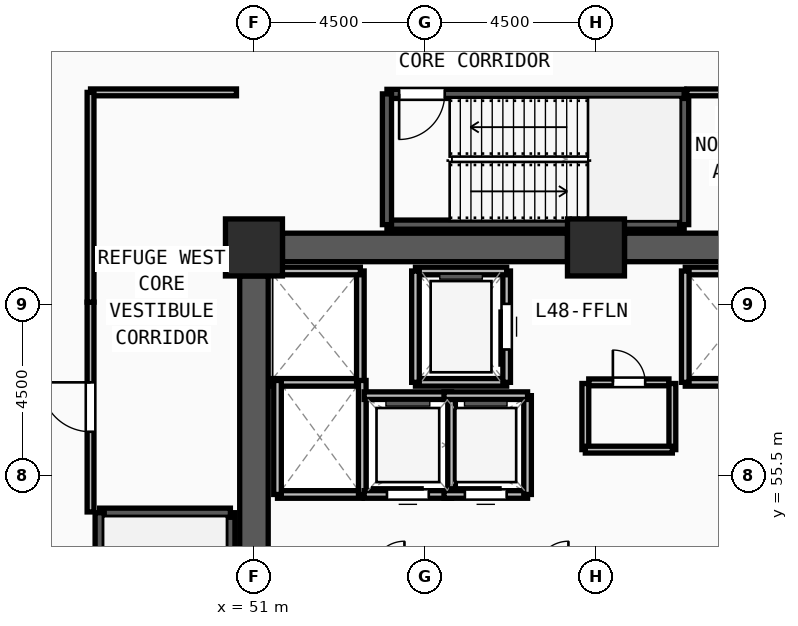
"""IFC4 building model, lengths in metres.
Left out: names, types, materials, properties, quantities, classifications, styles, units other than length and angle.
Written with IfcOpenShell. Run it as: python <this file> out.ifc"""

import sys

from ifc_helpers import new_model, si_unit, direction, frame, frame_2d, origin, origin_2d, place, context, subcontext, project, spatial, rectangle, extrude, source, transform, mapped, element, fill, save


model = new_model("IFC4")
c1 = context("Model", 3, precision=1e-05, world=origin(), true_north=direction((0.0, 1.0)))
c2 = subcontext(c1, "Body", "Model", "MODEL_VIEW")
j1 = project(units=[si_unit("LENGTHUNIT", "METRE"), si_unit("PLANEANGLEUNIT", "RADIAN")], contexts=[c1])
p1 = place(None, origin())
s1 = spatial("IfcSite", under=j1, at=p1, CompositionType="ELEMENT")
p2 = place(p1, origin())
s2 = spatial("IfcBuilding", under=s1, at=p2, CompositionType="ELEMENT")
p3 = place(p2, frame((0.0, 0.0, 185.25)))
s3 = spatial("IfcBuildingStorey", under=s2, at=p3, CompositionType="ELEMENT", Elevation=185.25)
m1 = source(origin(), c2, "Body", "SweptSolid", [
    extrude(rectangle(XDim=1.5, YDim=1.5, at=origin_2d()), origin(), (0.0, 0.0, 1.0), 4.5),
])
for number, where, z_axis, x_axis in (
    (1, (60.0, 61.5, 0.0), (0.0, 0.0, 1.0), (1.0, 0.0, 0.0)),
    (2, (51.0, 61.5, 0.0), (0.0, 0.0, 1.0), (1.0, 0.0, 0.0)),
):
    element("IfcColumn", number, at=place(p3, frame(where, z_axis=z_axis, x_axis=x_axis)), inside=s3, PredefinedType="COLUMN", context=c2, shape_type="MappedRepresentation", body=[
        mapped(m1, transform((0.0, 0.0, 0.0), x_axis=(1.0, 0.0, 0.0), y_axis=(0.0, 1.0, 0.0), z_axis=(0.0, 0.0, 1.0), scale=1.0)),
    ])
for number, where, z_axis, x_axis in (
    (3, (51.75, 61.5, 0.0), (0.0, 0.0, 1.0), (1.0, 0.0, 0.0)),
    (4, (60.75, 61.5, 0.0), (0.0, 0.0, 1.0), (1.0, 0.0, 0.0)),
):
    element("IfcWall", number, at=place(p3, frame(where, z_axis=z_axis, x_axis=x_axis)), inside=s3, PredefinedType="SHEAR", context=c2, shape_type="SweptSolid", body=[
        extrude(rectangle(XDim=7.5, YDim=0.75, at=frame_2d((3.75, 0.0))), origin(), (0.0, 0.0, 1.0), 4.22),
    ])
p4 = place(p3, frame((51.0, 47.25, 0.0), z_axis=(0.0, 0.0, 1.0), x_axis=(0.0, 1.0, 0.0)))
e5 = element("IfcWall", 5, at=p4, inside=s3, PredefinedType="SHEAR", context=c2, shape_type="SweptSolid", body=[
    extrude(rectangle(XDim=13.5, YDim=0.75, at=frame_2d((6.75, 0.0))), origin(), (0.0, 0.0, 1.0), 4.22),
])
p5 = place(p3, frame((50.38, 46.7, 0.0), z_axis=(0.0, 0.0, 1.0), x_axis=(0.0, 1.0, 0.0)))
e6 = element("IfcWall", 6, at=p5, inside=s3, PredefinedType="SOLIDWALL", context=c2, shape_type="SweptSolid", body=[
    extrude(rectangle(XDim=7.82, YDim=0.24, at=frame_2d((3.91, 0.0))), origin(), (0.0, 0.0, 1.0), 4.22),
])
p6 = place(p3, frame((50.38, 54.52, 0.0), z_axis=(0.0, 0.0, 1.0), x_axis=(-1.0, 0.0, 0.0)))
e7 = element("IfcWall", 7, at=p6, inside=s3, PredefinedType="SOLIDWALL", context=c2, shape_type="SweptSolid", body=[
    extrude(rectangle(XDim=3.44, YDim=0.24, at=frame_2d((1.72, 0.0))), origin(), (0.0, 0.0, 1.0), 4.22),
])
p7 = place(p3, frame((46.94, 54.52, 0.0), z_axis=(0.0, 0.0, 1.0), x_axis=(0.0, -1.0, 0.0)))
e8 = element("IfcWall", 8, at=p7, inside=s3, PredefinedType="SOLIDWALL", context=c2, shape_type="SweptSolid", body=[
    extrude(rectangle(XDim=7.82, YDim=0.24, at=frame_2d((3.91, 0.0))), origin(), (0.0, 0.0, 1.0), 4.22),
])
m2 = source(origin(), c2, "Body", "SweptSolid", [
    extrude(rectangle(XDim=1.2, YDim=2.2, at=frame_2d((0.6, 1.1))), frame((0.0, 0.13, 0.0), z_axis=(0.0, -1.0, 0.0), x_axis=(1.0, 0.0, 0.0)), (0.0, 0.0, 1.0), 0.26),
])
p8 = place(p7, frame((6.3, 0.0, 0.0)))
e9 = element("IfcOpeningElement", 9, at=p8, cuts=e8, PredefinedType="OPENING", context=c2, shape_type="MappedRepresentation", body=[
    mapped(m2, transform((0.0, 0.0, 0.0), x_axis=(1.0, 0.0, 0.0), y_axis=(0.0, 1.0, 0.0), z_axis=(0.0, 0.0, 1.0), scale=1.0)),
])
p9 = place(p3, frame((54.5, 62.1, 0.0), z_axis=(0.0, 0.0, 1.0), x_axis=(1.0, 0.0, 0.0)))
e10 = element("IfcWall", 10, at=p9, inside=s3, PredefinedType="SOLIDWALL", context=c2, shape_type="SweptSolid", body=[
    extrude(rectangle(XDim=7.82, YDim=0.24, at=frame_2d((3.91, 0.0))), origin(), (0.0, 0.0, 1.0), 4.22),
])
p10 = place(p3, frame((62.32, 62.1, 0.0), z_axis=(0.0, 0.0, 1.0), x_axis=(0.0, 1.0, 0.0)))
e11 = element("IfcWall", 11, at=p10, inside=s3, PredefinedType="SOLIDWALL", context=c2, shape_type="SweptSolid", body=[
    extrude(rectangle(XDim=3.44, YDim=0.24, at=frame_2d((1.72, 0.0))), origin(), (0.0, 0.0, 1.0), 4.22),
])
p11 = place(p3, frame((62.32, 65.54, 0.0), z_axis=(0.0, 0.0, 1.0), x_axis=(-1.0, 0.0, 0.0)))
e12 = element("IfcWall", 12, at=p11, inside=s3, PredefinedType="SOLIDWALL", context=c2, shape_type="SweptSolid", body=[
    extrude(rectangle(XDim=7.82, YDim=0.24, at=frame_2d((3.91, 0.0))), origin(), (0.0, 0.0, 1.0), 4.22),
])
p12 = place(p11, frame((6.3, 0.0, 0.0)))
e13 = element("IfcOpeningElement", 13, at=p12, cuts=e12, PredefinedType="OPENING", context=c2, shape_type="MappedRepresentation", body=[
    mapped(m2, transform((0.0, 0.0, 0.0), x_axis=(1.0, 0.0, 0.0), y_axis=(0.0, 1.0, 0.0), z_axis=(0.0, 0.0, 1.0), scale=1.0)),
])
p13 = place(p3, frame((54.5, 65.54, 0.0), z_axis=(0.0, 0.0, 1.0), x_axis=(0.0, -1.0, 0.0)))
e14 = element("IfcWall", 14, at=p13, inside=s3, PredefinedType="SOLIDWALL", context=c2, shape_type="SweptSolid", body=[
    extrude(rectangle(XDim=3.44, YDim=0.24, at=frame_2d((1.72, 0.0))), origin(), (0.0, 0.0, 1.0), 4.22),
])
p14 = place(p3, frame((55.25, 57.95, 0.0), z_axis=(0.0, 0.0, 1.0), x_axis=(1.0, 0.0, 0.0)))
e15 = element("IfcWall", 15, at=p14, inside=s3, PredefinedType="SOLIDWALL", context=c2, shape_type="SweptSolid", body=[
    extrude(rectangle(XDim=2.4, YDim=0.2, at=frame_2d((1.2, 0.0))), origin(), (0.0, 0.0, 1.0), 4.22),
])
p15 = place(p3, frame((57.65, 57.95, 0.0), z_axis=(0.0, 0.0, 1.0), x_axis=(0.0, 1.0, 0.0)))
e16 = element("IfcWall", 16, at=p15, inside=s3, PredefinedType="SOLIDWALL", context=c2, shape_type="SweptSolid", body=[
    extrude(rectangle(XDim=2.93, YDim=0.2, at=frame_2d((1.465, 0.0))), origin(), (0.0, 0.0, 1.0), 4.22),
])
m3 = source(origin(), c2, "Body", "SweptSolid", [
    extrude(rectangle(XDim=1.2, YDim=2.3, at=frame_2d((0.6, 1.15))), frame((0.0, 0.11, 0.0), z_axis=(0.0, -1.0, 0.0), x_axis=(1.0, 0.0, 0.0)), (0.0, 0.0, 1.0), 0.22),
])
p16 = place(p15, frame((0.865, 0.0, 0.0)))
e17 = element("IfcOpeningElement", 17, at=p16, cuts=e16, PredefinedType="OPENING", context=c2, shape_type="MappedRepresentation", body=[
    mapped(m3, transform((0.0, 0.0, 0.0), x_axis=(1.0, 0.0, 0.0), y_axis=(0.0, 1.0, 0.0), z_axis=(0.0, 0.0, 1.0), scale=1.0)),
])
p17 = place(p3, frame((57.65, 60.88, 0.0), z_axis=(0.0, 0.0, 1.0), x_axis=(-1.0, 0.0, 0.0)))
e18 = element("IfcWall", 18, at=p17, inside=s3, PredefinedType="SOLIDWALL", context=c2, shape_type="SweptSolid", body=[
    extrude(rectangle(XDim=2.4, YDim=0.2, at=frame_2d((1.2, 0.0))), origin(), (0.0, 0.0, 1.0), 4.22),
])
p18 = place(p3, frame((55.25, 60.88, 0.0), z_axis=(0.0, 0.0, 1.0), x_axis=(0.0, -1.0, 0.0)))
e19 = element("IfcWall", 19, at=p18, inside=s3, PredefinedType="SOLIDWALL", context=c2, shape_type="SweptSolid", body=[
    extrude(rectangle(XDim=2.93, YDim=0.2, at=frame_2d((1.465, 0.0))), origin(), (0.0, 0.0, 1.0), 4.22),
])
for number, where, z_axis, x_axis in (
    (20, (62.35, 57.95, 0.0), (0.0, 0.0, 1.0), (1.0, 0.0, 0.0)),
    (21, (64.75, 60.88, 0.0), (0.0, 0.0, 1.0), (-1.0, 0.0, 0.0)),
):
    element("IfcWall", number, at=place(p3, frame(where, z_axis=z_axis, x_axis=x_axis)), inside=s3, PredefinedType="SOLIDWALL", context=c2, shape_type="SweptSolid", body=[
        extrude(rectangle(XDim=2.4, YDim=0.2, at=frame_2d((1.2, 0.0))), origin(), (0.0, 0.0, 1.0), 4.22),
    ])
p19 = place(p3, frame((62.35, 60.88, 0.0), z_axis=(0.0, 0.0, 1.0), x_axis=(0.0, -1.0, 0.0)))
e22 = element("IfcWall", 22, at=p19, inside=s3, PredefinedType="SOLIDWALL", context=c2, shape_type="SweptSolid", body=[
    extrude(rectangle(XDim=2.93, YDim=0.2, at=frame_2d((1.465, 0.0))), origin(), (0.0, 0.0, 1.0), 4.22),
])
p20 = place(p3, frame((51.4, 57.95, 0.0), z_axis=(0.0, 0.0, 1.0), x_axis=(1.0, 0.0, 0.0)))
e23 = element("IfcWall", 23, at=p20, inside=s3, PredefinedType="SOLIDWALL", context=c2, shape_type="SweptSolid", body=[
    extrude(rectangle(XDim=2.4, YDim=0.2, at=frame_2d((1.2, 0.0))), origin(), (0.0, 0.0, 1.0), 4.22),
])
p21 = place(p3, frame((53.8, 57.95, 0.0), z_axis=(0.0, 0.0, 1.0), x_axis=(0.0, 1.0, 0.0)))
e24 = element("IfcWall", 24, at=p21, inside=s3, PredefinedType="SOLIDWALL", context=c2, shape_type="SweptSolid", body=[
    extrude(rectangle(XDim=2.93, YDim=0.2, at=frame_2d((1.465, 0.0))), origin(), (0.0, 0.0, 1.0), 4.22),
])
p22 = place(p3, frame((53.8, 60.88, 0.0), z_axis=(0.0, 0.0, 1.0), x_axis=(-1.0, 0.0, 0.0)))
e25 = element("IfcWall", 25, at=p22, inside=s3, PredefinedType="SOLIDWALL", context=c2, shape_type="SweptSolid", body=[
    extrude(rectangle(XDim=2.4, YDim=0.2, at=frame_2d((1.2, 0.0))), origin(), (0.0, 0.0, 1.0), 4.22),
])
p23 = place(p3, frame((51.62, 55.0, 0.0), z_axis=(0.0, 0.0, 1.0), x_axis=(1.0, 0.0, 0.0)))
e26 = element("IfcWall", 26, at=p23, inside=s3, PredefinedType="SOLIDWALL", context=c2, shape_type="SweptSolid", body=[
    extrude(rectangle(XDim=2.23, YDim=0.2, at=frame_2d((1.115, 0.0))), origin(), (0.0, 0.0, 1.0), 4.22),
])
for number, where, z_axis, x_axis in (
    (27, (53.85, 55.0, 0.0), (0.0, 0.0, 1.0), (0.0, 1.0, 0.0)),
    (28, (51.62, 58.0, 0.0), (0.0, 0.0, 1.0), (0.0, -1.0, 0.0)),
):
    element("IfcWall", number, at=place(p3, frame(where, z_axis=z_axis, x_axis=x_axis)), inside=s3, PredefinedType="SOLIDWALL", context=c2, shape_type="SweptSolid", body=[
        extrude(rectangle(XDim=3.0, YDim=0.2, at=frame_2d((1.5, 0.0))), origin(), (0.0, 0.0, 1.0), 4.22),
    ])
p24 = place(p3, frame((53.9, 55.0, 0.0), z_axis=(0.0, 0.0, 1.0), x_axis=(1.0, 0.0, 0.0)))
e29 = element("IfcWall", 29, at=p24, inside=s3, PredefinedType="SOLIDWALL", context=c2, shape_type="SweptSolid", body=[
    extrude(rectangle(XDim=2.3, YDim=0.2, at=frame_2d((1.15, 0.0))), origin(), (0.0, 0.0, 1.0), 4.22),
])
m4 = source(origin(), c2, "Body", "SweptSolid", [
    extrude(rectangle(XDim=1.1, YDim=2.2, at=frame_2d((0.55, 1.1))), frame((0.0, 0.11, 0.0), z_axis=(0.0, -1.0, 0.0), x_axis=(1.0, 0.0, 0.0)), (0.0, 0.0, 1.0), 0.22),
])
p25 = place(p24, frame((0.6, 0.0, 0.0)))
e30 = element("IfcOpeningElement", 30, at=p25, cuts=e29, PredefinedType="OPENING", context=c2, shape_type="MappedRepresentation", body=[
    mapped(m4, transform((0.0, 0.0, 0.0), x_axis=(1.0, 0.0, 0.0), y_axis=(0.0, 1.0, 0.0), z_axis=(0.0, 0.0, 1.0), scale=1.0)),
])
p26 = place(p3, frame((56.2, 55.0, 0.0), z_axis=(0.0, 0.0, 1.0), x_axis=(0.0, 1.0, 0.0)))
e31 = element("IfcWall", 31, at=p26, inside=s3, PredefinedType="SOLIDWALL", context=c2, shape_type="SweptSolid", body=[
    extrude(rectangle(XDim=2.6, YDim=0.2, at=frame_2d((1.3, 0.0))), origin(), (0.0, 0.0, 1.0), 4.22),
])
p27 = place(p3, frame((56.2, 57.6, 0.0), z_axis=(0.0, 0.0, 1.0), x_axis=(-1.0, 0.0, 0.0)))
e32 = element("IfcWall", 32, at=p27, inside=s3, PredefinedType="SOLIDWALL", context=c2, shape_type="SweptSolid", body=[
    extrude(rectangle(XDim=2.3, YDim=0.2, at=frame_2d((1.15, 0.0))), origin(), (0.0, 0.0, 1.0), 4.22),
])
p28 = place(p3, frame((56.0, 55.0, 0.0), z_axis=(0.0, 0.0, 1.0), x_axis=(1.0, 0.0, 0.0)))
e33 = element("IfcWall", 33, at=p28, inside=s3, PredefinedType="SOLIDWALL", context=c2, shape_type="SweptSolid", body=[
    extrude(rectangle(XDim=2.2, YDim=0.2, at=frame_2d((1.1, 0.0))), origin(), (0.0, 0.0, 1.0), 4.22),
])
p29 = place(p28, frame((0.55, 0.0, 0.0)))
e34 = element("IfcOpeningElement", 34, at=p29, cuts=e33, PredefinedType="OPENING", context=c2, shape_type="MappedRepresentation", body=[
    mapped(m4, transform((0.0, 0.0, 0.0), x_axis=(1.0, 0.0, 0.0), y_axis=(0.0, 1.0, 0.0), z_axis=(0.0, 0.0, 1.0), scale=1.0)),
])
p30 = place(p3, frame((58.2, 55.0, 0.0), z_axis=(0.0, 0.0, 1.0), x_axis=(0.0, 1.0, 0.0)))
e35 = element("IfcWall", 35, at=p30, inside=s3, PredefinedType="SOLIDWALL", context=c2, shape_type="SweptSolid", body=[
    extrude(rectangle(XDim=2.6, YDim=0.2, at=frame_2d((1.3, 0.0))), origin(), (0.0, 0.0, 1.0), 4.22),
])
p31 = place(p3, frame((58.2, 57.6, 0.0), z_axis=(0.0, 0.0, 1.0), x_axis=(-1.0, 0.0, 0.0)))
e36 = element("IfcWall", 36, at=p31, inside=s3, PredefinedType="SOLIDWALL", context=c2, shape_type="SweptSolid", body=[
    extrude(rectangle(XDim=2.2, YDim=0.2, at=frame_2d((1.1, 0.0))), origin(), (0.0, 0.0, 1.0), 4.22),
])
p32 = place(p3, frame((59.81, 57.95, 0.0), z_axis=(0.0, 0.0, 1.0), x_axis=(1.0, 0.0, 0.0)))
e37 = element("IfcWall", 37, at=p32, inside=s3, PredefinedType="PARTITIONING", context=c2, shape_type="SweptSolid", body=[
    extrude(rectangle(XDim=2.11, YDim=0.18, at=frame_2d((1.055, 0.0))), origin(), (0.0, 0.0, 1.0), 4.22),
])
m5 = source(origin(), c2, "Body", "SweptSolid", [
    extrude(rectangle(XDim=0.85, YDim=2.1, at=frame_2d((0.425, 1.05))), frame((0.0, 0.1, 0.0), z_axis=(0.0, -1.0, 0.0), x_axis=(1.0, 0.0, 0.0)), (0.0, 0.0, 1.0), 0.2),
])
p33 = place(p32, frame((0.635, 0.0, 0.0)))
e38 = element("IfcOpeningElement", 38, at=p33, cuts=e37, PredefinedType="OPENING", context=c2, shape_type="MappedRepresentation", body=[
    mapped(m5, transform((0.0, 0.0, 0.0), x_axis=(1.0, 0.0, 0.0), y_axis=(0.0, 1.0, 0.0), z_axis=(0.0, 0.0, 1.0), scale=1.0)),
])
p34 = place(p3, frame((62.39, 65.58, 0.0), z_axis=(0.0, 0.0, 1.0), x_axis=(1.0, 0.0, 0.0)))
e39 = element("IfcWall", 39, at=p34, inside=s3, PredefinedType="PARTITIONING", context=c2, shape_type="SweptSolid", body=[
    extrude(rectangle(XDim=3.49, YDim=0.18, at=frame_2d((1.745, 0.0))), origin(), (0.0, 0.0, 1.0), 4.22),
])
m6 = source(origin(), c2, "Body", "SweptSolid", [
    extrude(rectangle(XDim=1.0, YDim=2.2, at=frame_2d((0.5, 1.1))), frame((0.0, 0.1, 0.0), z_axis=(0.0, -1.0, 0.0), x_axis=(1.0, 0.0, 0.0)), (0.0, 0.0, 1.0), 0.2),
])
p35 = place(p34, frame((1.245, 0.0, 0.0)))
e40 = element("IfcOpeningElement", 40, at=p35, cuts=e39, PredefinedType="OPENING", context=c2, shape_type="MappedRepresentation", body=[
    mapped(m6, transform((0.0, 0.0, 0.0), x_axis=(1.0, 0.0, 0.0), y_axis=(0.0, 1.0, 0.0), z_axis=(0.0, 0.0, 1.0), scale=1.0)),
])
p36 = place(p3, frame((46.7, 54.54, 0.0), z_axis=(0.0, 0.0, 1.0), x_axis=(0.0, 1.0, 0.0)))
e41 = element("IfcWall", 41, at=p36, inside=s3, PredefinedType="PARTITIONING", context=c2, shape_type="SweptSolid", body=[
    extrude(rectangle(XDim=5.52, YDim=0.18, at=frame_2d((2.76, 0.0))), origin(), (0.0, 0.0, 1.0), 4.22),
])
m7 = source(origin(), c2, "Body", "SweptSolid", [
    extrude(rectangle(XDim=1.3, YDim=2.2, at=frame_2d((0.65, 1.1))), frame((0.0, 0.1, 0.0), z_axis=(0.0, -1.0, 0.0), x_axis=(1.0, 0.0, 0.0)), (0.0, 0.0, 1.0), 0.2),
])
p37 = place(p36, frame((2.11, 0.0, 0.0)))
e42 = element("IfcOpeningElement", 42, at=p37, cuts=e41, PredefinedType="OPENING", context=c2, shape_type="MappedRepresentation", body=[
    mapped(m7, transform((0.0, 0.0, 0.0), x_axis=(1.0, 0.0, 0.0), y_axis=(0.0, 1.0, 0.0), z_axis=(0.0, 0.0, 1.0), scale=1.0)),
])
for number, where, z_axis, x_axis in (
    (43, (59.72, 56.18, 0.0), (0.0, 0.0, 1.0), (0.0, 1.0, 0.0)),
    (44, (62.01, 56.18, 0.0), (0.0, 0.0, 1.0), (0.0, 1.0, 0.0)),
):
    element("IfcWall", number, at=place(p3, frame(where, z_axis=z_axis, x_axis=x_axis)), inside=s3, PredefinedType="PARTITIONING", context=c2, shape_type="SweptSolid", body=[
        extrude(rectangle(XDim=1.74, YDim=0.18, at=frame_2d((0.87, 0.0))), origin(), (0.0, 0.0, 1.0), 4.22),
    ])
p38 = place(p3, frame((59.72, 56.18, 0.0), z_axis=(0.0, 0.0, 1.0), x_axis=(1.0, 0.0, 0.0)))
e45 = element("IfcWall", 45, at=p38, inside=s3, PredefinedType="PARTITIONING", context=c2, shape_type="SweptSolid", body=[
    extrude(rectangle(XDim=2.29, YDim=0.18, at=frame_2d((1.145, 0.0))), origin(), (0.0, 0.0, 1.0), 4.22),
])
p39 = place(p3, frame((46.7, 65.58, 0.0), z_axis=(0.0, 0.0, 1.0), x_axis=(1.0, 0.0, 0.0)))
e46 = element("IfcWall", 46, at=p39, inside=s3, PredefinedType="PARTITIONING", context=c2, shape_type="SweptSolid", body=[
    extrude(rectangle(XDim=3.84, YDim=0.18, at=frame_2d((1.92, 0.0))), origin(), (0.0, 0.0, 1.0), 4.22),
])
p40 = place(p3, frame((46.7, 60.06, 0.0), z_axis=(0.0, 0.0, 1.0), x_axis=(0.0, 1.0, 0.0)))
e47 = element("IfcWall", 47, at=p40, inside=s3, PredefinedType="PARTITIONING", context=c2, shape_type="SweptSolid", body=[
    extrude(rectangle(XDim=5.52, YDim=0.18, at=frame_2d((2.76, 0.0))), origin(), (0.0, 0.0, 1.0), 4.22),
])
m8 = source(origin(), c2, "Body", "SweptSolid", [
    extrude(rectangle(XDim=1.2, YDim=2.2, at=frame_2d((0.6, 1.1))), frame((0.0, 0.025, 0.0), z_axis=(0.0, -1.0, 0.0), x_axis=(1.0, 0.0, 0.0)), (0.0, 0.0, 1.0), 0.05),
])
p41 = place(p12, origin())
e48 = element("IfcDoor", 48, at=p41, inside=s3, OperationType="SINGLE_SWING_RIGHT", PredefinedType="DOOR", context=c2, shape_type="MappedRepresentation", body=[
    mapped(m8, transform((0.0, 0.0, 0.0), x_axis=(1.0, 0.0, 0.0), y_axis=(0.0, 1.0, 0.0), z_axis=(0.0, 0.0, 1.0), scale=1.0)),
])
fill(e13, e48)
m9 = source(origin(), c2, "Body", "SweptSolid", [
    extrude(rectangle(XDim=1.2, YDim=2.3, at=frame_2d((0.6, 1.15))), frame((0.0, 0.025, 0.0), z_axis=(0.0, -1.0, 0.0), x_axis=(1.0, 0.0, 0.0)), (0.0, 0.0, 1.0), 0.05),
])
p42 = place(p16, origin())
e49 = element("IfcDoor", 49, at=p42, inside=s3, OperationType="SLIDING_TO_LEFT", PredefinedType="DOOR", context=c2, shape_type="MappedRepresentation", body=[
    mapped(m9, transform((0.0, 0.0, 0.0), x_axis=(1.0, 0.0, 0.0), y_axis=(0.0, 1.0, 0.0), z_axis=(0.0, 0.0, 1.0), scale=1.0)),
])
fill(e17, e49)
m10 = source(origin(), c2, "Body", "SweptSolid", [
    extrude(rectangle(XDim=1.1, YDim=2.2, at=frame_2d((0.55, 1.1))), frame((0.0, 0.025, 0.0), z_axis=(0.0, -1.0, 0.0), x_axis=(1.0, 0.0, 0.0)), (0.0, 0.0, 1.0), 0.05),
])
p43 = place(p25, origin())
e50 = element("IfcDoor", 50, at=p43, inside=s3, OperationType="SLIDING_TO_LEFT", PredefinedType="DOOR", context=c2, shape_type="MappedRepresentation", body=[
    mapped(m10, transform((0.0, 0.0, 0.0), x_axis=(1.0, 0.0, 0.0), y_axis=(0.0, 1.0, 0.0), z_axis=(0.0, 0.0, 1.0), scale=1.0)),
])
fill(e30, e50)
p44 = place(p29, origin())
e51 = element("IfcDoor", 51, at=p44, inside=s3, OperationType="SLIDING_TO_LEFT", PredefinedType="DOOR", context=c2, shape_type="MappedRepresentation", body=[
    mapped(m10, transform((0.0, 0.0, 0.0), x_axis=(1.0, 0.0, 0.0), y_axis=(0.0, 1.0, 0.0), z_axis=(0.0, 0.0, 1.0), scale=1.0)),
])
fill(e34, e51)
m11 = source(origin(), c2, "Body", "SweptSolid", [
    extrude(rectangle(XDim=0.85, YDim=2.1, at=frame_2d((0.425, 1.05))), frame((0.0, 0.025, 0.0), z_axis=(0.0, -1.0, 0.0), x_axis=(1.0, 0.0, 0.0)), (0.0, 0.0, 1.0), 0.05),
])
p45 = place(p33, origin())
e52 = element("IfcDoor", 52, at=p45, inside=s3, OperationType="SINGLE_SWING_LEFT", PredefinedType="DOOR", context=c2, shape_type="MappedRepresentation", body=[
    mapped(m11, transform((0.0, 0.0, 0.0), x_axis=(1.0, 0.0, 0.0), y_axis=(0.0, 1.0, 0.0), z_axis=(0.0, 0.0, 1.0), scale=1.0)),
])
fill(e38, e52)
m12 = source(origin(), c2, "Body", "SweptSolid", [
    extrude(rectangle(XDim=1.3, YDim=2.2, at=frame_2d((0.65, 1.1))), frame((0.0, 0.025, 0.0), z_axis=(0.0, -1.0, 0.0), x_axis=(1.0, 0.0, 0.0)), (0.0, 0.0, 1.0), 0.05),
])
p46 = place(p37, origin())
e53 = element("IfcDoor", 53, at=p46, inside=s3, OperationType="SINGLE_SWING_RIGHT", PredefinedType="DOOR", context=c2, shape_type="MappedRepresentation", body=[
    mapped(m12, transform((0.0, 0.0, 0.0), x_axis=(1.0, 0.0, 0.0), y_axis=(0.0, 1.0, 0.0), z_axis=(0.0, 0.0, 1.0), scale=1.0)),
])
fill(e42, e53)
save(model, sys.argv[1])
